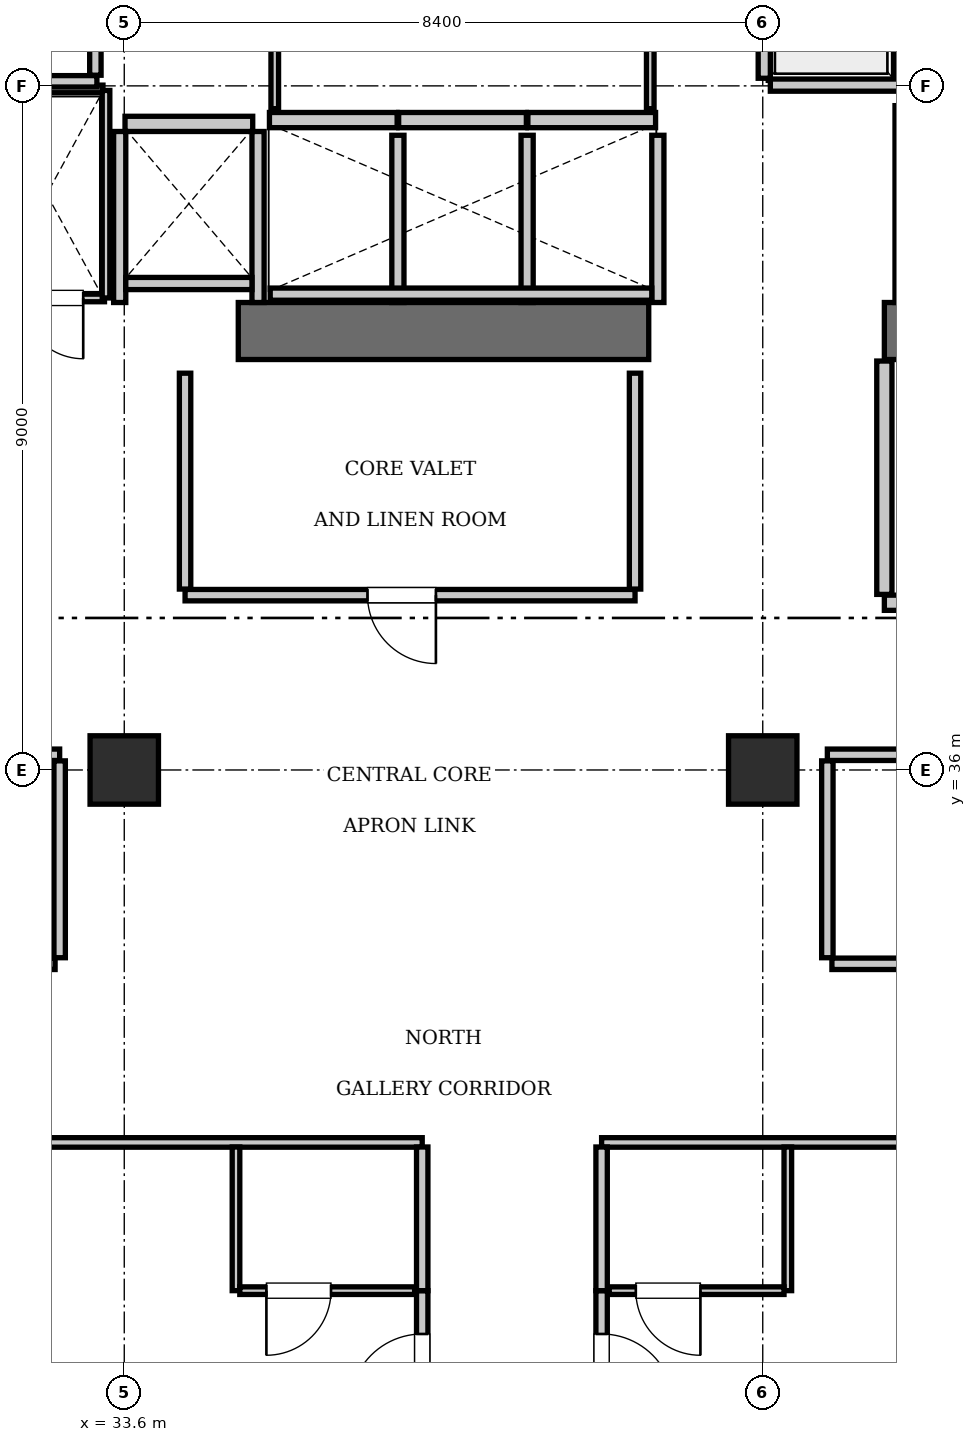
"""IFC4 building model, lengths in metres.
Left out: names, types, materials, properties, quantities, classifications, styles, units other than length and angle.
Written with IfcOpenShell. Run it as: python <this file> out.ifc"""

import sys

from ifc_helpers import new_model, si_unit, direction, frame, frame_2d, origin, origin_2d, place, context, subcontext, project, spatial, rectangle, extrude, element, fill, save


model = new_model("IFC4")
c1 = context("Model", 3, precision=1e-05, world=origin(), true_north=direction((0.0, 1.0)))
c2 = subcontext(c1, "Body", "Model", "MODEL_VIEW")
j1 = project(units=[si_unit("LENGTHUNIT", "METRE"), si_unit("PLANEANGLEUNIT", "RADIAN")], contexts=[c1])
p1 = place(None, origin())
s1 = spatial("IfcSite", under=j1, at=p1, CompositionType="ELEMENT")
p2 = place(p1, origin())
s2 = spatial("IfcBuilding", under=s1, at=p2, CompositionType="ELEMENT")
p3 = place(p2, frame((0.0, 0.0, 173.6)))
s3 = spatial("IfcBuildingStorey", under=s2, at=p3, CompositionType="ELEMENT", Elevation=173.6)
p4 = place(p3, frame((35.1, 41.775, 0.0), z_axis=(0.0, 0.0, 1.0), x_axis=(1.0, 0.0, 0.0)))
e1 = element("IfcWall", 1, at=p4, inside=s3, PredefinedType="SHEAR", context=c2, shape_type="SweptSolid", body=[
    extrude(rectangle(XDim=5.4, YDim=0.75, at=frame_2d((2.7, 0.0))), origin(), (0.0, 0.0, 1.0), 3.85),
])
p5 = place(p3, frame((43.6, 41.775, 0.0), z_axis=(0.0, 0.0, 1.0), x_axis=(1.0, 0.0, 0.0)))
e2 = element("IfcWall", 2, at=p5, inside=s3, PredefinedType="SHEAR", context=c2, shape_type="SweptSolid", body=[
    extrude(rectangle(XDim=6.8, YDim=0.75, at=frame_2d((3.4, 0.0))), origin(), (0.0, 0.0, 1.0), 3.85),
])
p6 = place(p5, frame((3.9, 0.0, 0.0)))
e3 = element("IfcOpeningElement", 3, at=p6, cuts=e2, PredefinedType="OPENING", context=c2, shape_type="SweptSolid", body=[
    extrude(rectangle(XDim=1.15, YDim=2.15, at=frame_2d((0.575, 1.075))), frame((0.0, 0.385, 0.0), z_axis=(0.0, -1.0, 0.0), x_axis=(1.0, 0.0, 0.0)), (0.0, 0.0, 1.0), 0.77),
])
p7 = place(p5, frame((0.55, 0.0, 0.0)))
e4 = element("IfcOpeningElement", 4, at=p7, cuts=e2, PredefinedType="OPENING", context=c2, shape_type="SweptSolid", body=[
    extrude(rectangle(XDim=1.1, YDim=2.2, at=frame_2d((0.55, 1.1))), frame((0.0, 0.385, 0.0), z_axis=(0.0, -1.0, 0.0), x_axis=(1.0, 0.0, 0.0)), (0.0, 0.0, 1.0), 0.77),
])
for number, where, z_axis, x_axis in (
    (5, (33.6, 36.0, 0.0), (0.0, 0.0, 1.0), (1.0, 0.0, 0.0)),
    (6, (42.0, 36.0, 0.0), (0.0, 0.0, 1.0), (1.0, 0.0, 0.0)),
):
    element("IfcColumn", number, at=place(p3, frame(where, z_axis=z_axis, x_axis=x_axis)), inside=s3, PredefinedType="COLUMN", context=c2, shape_type="SweptSolid", body=[
        extrude(rectangle(XDim=0.9, YDim=0.9, at=origin_2d()), origin(), (0.0, 0.0, 1.0), 3.85),
    ])
for number, where, z_axis, x_axis in (
    (7, (35.51, 44.55, 0.0), (0.0, 0.0, 1.0), (1.0, 0.0, 0.0)),
    (8, (37.21, 44.55, 0.0), (0.0, 0.0, 1.0), (1.0, 0.0, 0.0)),
):
    element("IfcWall", number, at=place(p3, frame(where, z_axis=z_axis, x_axis=x_axis)), inside=s3, PredefinedType="SOLIDWALL", context=c2, shape_type="SweptSolid", body=[
        extrude(rectangle(XDim=1.68, YDim=0.2, at=frame_2d((0.84, 0.0))), origin(), (0.0, 0.0, 1.0), 3.61),
    ])
p8 = place(p3, frame((38.91, 44.55, 0.0), z_axis=(0.0, 0.0, 1.0), x_axis=(1.0, 0.0, 0.0)))
e9 = element("IfcWall", 9, at=p8, inside=s3, PredefinedType="SOLIDWALL", context=c2, shape_type="SweptSolid", body=[
    extrude(rectangle(XDim=1.68, YDim=0.2, at=frame_2d((0.84, 0.0))), origin(), (0.0, 0.0, 1.0), 3.61),
])
p9 = place(p3, frame((33.61, 44.5, 0.0), z_axis=(0.0, 0.0, 1.0), x_axis=(1.0, 0.0, 0.0)))
e10 = element("IfcWall", 10, at=p9, inside=s3, PredefinedType="SOLIDWALL", context=c2, shape_type="SweptSolid", body=[
    extrude(rectangle(XDim=1.68, YDim=0.2, at=frame_2d((0.84, 0.0))), origin(), (0.0, 0.0, 1.0), 3.61),
])
p10 = place(p3, frame((43.82, 42.15, 0.0), z_axis=(0.0, 0.0, 1.0), x_axis=(0.0, 1.0, 0.0)))
e11 = element("IfcWall", 11, at=p10, inside=s3, PredefinedType="SOLIDWALL", context=c2, shape_type="SweptSolid", body=[
    extrude(rectangle(XDim=2.59, YDim=0.16, at=frame_2d((1.295, 0.0))), origin(), (0.0, 0.0, 1.0), 3.61),
])
for number, where, z_axis, x_axis in (
    (12, (42.02, 45.1, 0.0), (0.0, 0.0, 1.0), (0.0, 1.0, 0.0)),
    (13, (43.8, 45.1, 0.0), (0.0, 0.0, 1.0), (0.0, 1.0, 0.0)),
):
    element("IfcWall", number, at=place(p3, frame(where, z_axis=z_axis, x_axis=x_axis)), inside=s3, PredefinedType="SOLIDWALL", context=c2, shape_type="SweptSolid", body=[
        extrude(rectangle(XDim=1.95, YDim=0.16, at=frame_2d((0.975, 0.0))), origin(), (0.0, 0.0, 1.0), 3.61),
    ])
p11 = place(p3, frame((42.1, 45.01, 0.0), z_axis=(0.0, 0.0, 1.0), x_axis=(1.0, 0.0, 0.0)))
e14 = element("IfcWall", 14, at=p11, inside=s3, PredefinedType="SOLIDWALL", context=c2, shape_type="SweptSolid", body=[
    extrude(rectangle(XDim=3.45, YDim=0.16, at=frame_2d((1.725, 0.0))), origin(), (0.0, 0.0, 1.0), 3.61),
])
for number, where, z_axis, x_axis in (
    (15, (37.2, 42.15, 0.0), (0.0, 0.0, 1.0), (0.0, 1.0, 0.0)),
    (16, (38.9, 42.15, 0.0), (0.0, 0.0, 1.0), (0.0, 1.0, 0.0)),
    (17, (40.62, 42.15, 0.0), (0.0, 0.0, 1.0), (0.0, 1.0, 0.0)),
):
    element("IfcWall", number, at=place(p3, frame(where, z_axis=z_axis, x_axis=x_axis)), inside=s3, PredefinedType="SOLIDWALL", context=c2, shape_type="SweptSolid", body=[
        extrude(rectangle(XDim=2.2, YDim=0.16, at=frame_2d((1.1, 0.0))), origin(), (0.0, 0.0, 1.0), 3.61),
    ])
p12 = place(p3, frame((35.52, 42.26, 0.0), z_axis=(0.0, 0.0, 1.0), x_axis=(1.0, 0.0, 0.0)))
e18 = element("IfcWall", 18, at=p12, inside=s3, PredefinedType="SOLIDWALL", context=c2, shape_type="SweptSolid", body=[
    extrude(rectangle(XDim=5.02, YDim=0.16, at=frame_2d((2.51, 0.0))), origin(), (0.0, 0.0, 1.0), 3.61),
])
for number, where, z_axis, x_axis in (
    (19, (33.54, 42.15, 0.0), (0.0, 0.0, 1.0), (0.0, 1.0, 0.0)),
    (20, (35.36, 42.15, 0.0), (0.0, 0.0, 1.0), (0.0, 1.0, 0.0)),
):
    element("IfcWall", number, at=place(p3, frame(where, z_axis=z_axis, x_axis=x_axis)), inside=s3, PredefinedType="SOLIDWALL", context=c2, shape_type="SweptSolid", body=[
        extrude(rectangle(XDim=2.25, YDim=0.16, at=frame_2d((1.125, 0.0))), origin(), (0.0, 0.0, 1.0), 3.61),
    ])
p13 = place(p3, frame((33.62, 42.4, 0.0), z_axis=(0.0, 0.0, 1.0), x_axis=(1.0, 0.0, 0.0)))
e21 = element("IfcWall", 21, at=p13, inside=s3, PredefinedType="SOLIDWALL", context=c2, shape_type="SweptSolid", body=[
    extrude(rectangle(XDim=1.66, YDim=0.16, at=frame_2d((0.83, 0.0))), origin(), (0.0, 0.0, 1.0), 3.61),
])
p14 = place(p3, frame((43.6, 38.2, 0.0), z_axis=(0.0, 0.0, 1.0), x_axis=(1.0, 0.0, 0.0)))
e22 = element("IfcWall", 22, at=p14, inside=s3, PredefinedType="PARTITIONING", context=c2, shape_type="SweptSolid", body=[
    extrude(rectangle(XDim=5.8, YDim=0.2, at=frame_2d((2.9, 0.0))), origin(), (0.0, 0.0, 1.0), 3.61),
])
p15 = place(p14, frame((2.3, 0.0, 0.0)))
e23 = element("IfcOpeningElement", 23, at=p15, cuts=e22, PredefinedType="OPENING", context=c2, shape_type="SweptSolid", body=[
    extrude(rectangle(XDim=1.15, YDim=2.15, at=frame_2d((0.575, 1.075))), frame((0.0, 0.11, 0.0), z_axis=(0.0, -1.0, 0.0), x_axis=(1.0, 0.0, 0.0)), (0.0, 0.0, 1.0), 0.22),
])
p16 = place(p3, frame((43.6, 38.31, 0.0), z_axis=(0.0, 0.0, 1.0), x_axis=(0.0, 1.0, 0.0)))
e24 = element("IfcWall", 24, at=p16, inside=s3, PredefinedType="PARTITIONING", context=c2, shape_type="SweptSolid", body=[
    extrude(rectangle(XDim=3.07, YDim=0.2, at=frame_2d((1.535, 0.0))), origin(), (0.0, 0.0, 1.0), 3.61),
])
p17 = place(p3, frame((32.02, 42.21, 0.0), z_axis=(0.0, 0.0, 1.0), x_axis=(1.0, 0.0, 0.0)))
e25 = element("IfcWall", 25, at=p17, inside=s3, PredefinedType="PARTITIONING", context=c2, shape_type="SweptSolid", body=[
    extrude(rectangle(XDim=1.32, YDim=0.1, at=frame_2d((0.66, 0.0))), origin(), (0.0, 0.0, 1.0), 3.61),
])
p18 = place(p17, frame((0.24, 0.0, 0.0)))
e26 = element("IfcOpeningElement", 26, at=p18, cuts=e25, PredefinedType="OPENING", context=c2, shape_type="SweptSolid", body=[
    extrude(rectangle(XDim=0.8, YDim=2.05, at=frame_2d((0.4, 1.025))), frame((0.0, 0.06, 0.0), z_axis=(0.0, -1.0, 0.0), x_axis=(1.0, 0.0, 0.0)), (0.0, 0.0, 1.0), 0.12),
])
p19 = place(p3, frame((31.84, 44.96, 0.0), z_axis=(0.0, 0.0, 1.0), x_axis=(1.0, 0.0, 0.0)))
e27 = element("IfcWall", 27, at=p19, inside=s3, PredefinedType="PARTITIONING", context=c2, shape_type="SweptSolid", body=[
    extrude(rectangle(XDim=1.48, YDim=0.1, at=frame_2d((0.74, 0.0))), origin(), (0.0, 0.0, 1.0), 3.61),
])
p20 = place(p3, frame((33.36, 42.21, 0.0), z_axis=(0.0, 0.0, 1.0), x_axis=(0.0, 1.0, 0.0)))
e28 = element("IfcWall", 28, at=p20, inside=s3, PredefinedType="PARTITIONING", context=c2, shape_type="SweptSolid", body=[
    extrude(rectangle(XDim=2.73, YDim=0.1, at=frame_2d((1.365, 0.0))), origin(), (0.0, 0.0, 1.0), 3.61),
])
for number, where, z_axis, x_axis in (
    (29, (35.58, 44.7, 0.0), (0.0, 0.0, 1.0), (0.0, 1.0, 0.0)),
    (30, (40.52, 44.7, 0.0), (0.0, 0.0, 1.0), (0.0, 1.0, 0.0)),
):
    element("IfcWall", number, at=place(p3, frame(where, z_axis=z_axis, x_axis=x_axis)), inside=s3, PredefinedType="PARTITIONING", context=c2, shape_type="SweptSolid", body=[
        extrude(rectangle(XDim=1.08, YDim=0.1, at=frame_2d((0.54, 0.0))), origin(), (0.0, 0.0, 1.0), 3.61),
    ])
p21 = place(p3, frame((30.06, 45.06, 0.0), z_axis=(0.0, 0.0, 1.0), x_axis=(1.0, 0.0, 0.0)))
e31 = element("IfcWall", 31, at=p21, inside=s3, PredefinedType="PARTITIONING", context=c2, shape_type="SweptSolid", body=[
    extrude(rectangle(XDim=3.18, YDim=0.15, at=frame_2d((1.59, 0.0))), origin(), (0.0, 0.0, 1.0), 3.61),
])
p22 = place(p3, frame((33.22, 45.14, 0.0), z_axis=(0.0, 0.0, 1.0), x_axis=(0.0, 1.0, 0.0)))
e32 = element("IfcWall", 32, at=p22, inside=s3, PredefinedType="PARTITIONING", context=c2, shape_type="SweptSolid", body=[
    extrude(rectangle(XDim=4.16, YDim=0.15, at=frame_2d((2.08, 0.0))), origin(), (0.0, 0.0, 1.0), 3.61),
])
p23 = place(p3, frame((34.4, 38.3, 0.0), z_axis=(0.0, 0.0, 1.0), x_axis=(1.0, 0.0, 0.0)))
e33 = element("IfcWall", 33, at=p23, inside=s3, PredefinedType="PARTITIONING", context=c2, shape_type="SweptSolid", body=[
    extrude(rectangle(XDim=5.92, YDim=0.15, at=frame_2d((2.96, 0.0))), origin(), (0.0, 0.0, 1.0), 3.61),
])
p24 = place(p23, frame((2.4, 0.0, 0.0)))
e34 = element("IfcOpeningElement", 34, at=p24, cuts=e33, PredefinedType="OPENING", context=c2, shape_type="SweptSolid", body=[
    extrude(rectangle(XDim=0.9, YDim=2.1, at=frame_2d((0.45, 1.05))), frame((0.0, 0.085, 0.0), z_axis=(0.0, -1.0, 0.0), x_axis=(1.0, 0.0, 0.0)), (0.0, 0.0, 1.0), 0.17),
])
for number, where, z_axis, x_axis in (
    (35, (34.4, 38.38, 0.0), (0.0, 0.0, 1.0), (0.0, 1.0, 0.0)),
    (36, (40.32, 38.38, 0.0), (0.0, 0.0, 1.0), (0.0, 1.0, 0.0)),
):
    element("IfcWall", number, at=place(p3, frame(where, z_axis=z_axis, x_axis=x_axis)), inside=s3, PredefinedType="PARTITIONING", context=c2, shape_type="SweptSolid", body=[
        extrude(rectangle(XDim=2.84, YDim=0.15, at=frame_2d((1.42, 0.0))), origin(), (0.0, 0.0, 1.0), 3.61),
    ])
p25 = place(p3, frame((28.32, 36.2, 0.0), z_axis=(0.0, 0.0, 1.0), x_axis=(1.0, 0.0, 0.0)))
e37 = element("IfcWall", 37, at=p25, inside=s3, PredefinedType="PARTITIONING", context=c2, shape_type="SweptSolid", body=[
    extrude(rectangle(XDim=4.43, YDim=0.15, at=frame_2d((2.215, 0.0))), origin(), (0.0, 0.0, 1.0), 3.61),
])
p26 = place(p3, frame((32.75, 33.53, 0.0), z_axis=(0.0, 0.0, 1.0), x_axis=(0.0, 1.0, 0.0)))
e38 = element("IfcWall", 38, at=p26, inside=s3, PredefinedType="PARTITIONING", context=c2, shape_type="SweptSolid", body=[
    extrude(rectangle(XDim=2.59, YDim=0.15, at=frame_2d((1.295, 0.0))), origin(), (0.0, 0.0, 1.0), 3.61),
])
p27 = place(p3, frame((28.38, 33.45, 0.0), z_axis=(0.0, 0.0, 1.0), x_axis=(1.0, 0.0, 0.0)))
e39 = element("IfcWall", 39, at=p27, inside=s3, PredefinedType="PARTITIONING", context=c2, shape_type="SweptSolid", body=[
    extrude(rectangle(XDim=4.31, YDim=0.15, at=frame_2d((2.155, 0.0))), origin(), (0.0, 0.0, 1.0), 3.61),
])
p28 = place(p27, frame((1.705, 0.0, 0.0)))
e40 = element("IfcOpeningElement", 40, at=p28, cuts=e39, PredefinedType="OPENING", context=c2, shape_type="SweptSolid", body=[
    extrude(rectangle(XDim=0.9, YDim=2.1, at=frame_2d((0.45, 1.05))), frame((0.0, 0.085, 0.0), z_axis=(0.0, -1.0, 0.0), x_axis=(1.0, 0.0, 0.0)), (0.0, 0.0, 1.0), 0.17),
])
p29 = place(p3, frame((42.85, 36.2, 0.0), z_axis=(0.0, 0.0, 1.0), x_axis=(1.0, 0.0, 0.0)))
e41 = element("IfcWall", 41, at=p29, inside=s3, PredefinedType="PARTITIONING", context=c2, shape_type="SweptSolid", body=[
    extrude(rectangle(XDim=4.43, YDim=0.15, at=frame_2d((2.215, 0.0))), origin(), (0.0, 0.0, 1.0), 3.61),
])
p30 = place(p3, frame((42.85, 33.53, 0.0), z_axis=(0.0, 0.0, 1.0), x_axis=(0.0, 1.0, 0.0)))
e42 = element("IfcWall", 42, at=p30, inside=s3, PredefinedType="PARTITIONING", context=c2, shape_type="SweptSolid", body=[
    extrude(rectangle(XDim=2.59, YDim=0.15, at=frame_2d((1.295, 0.0))), origin(), (0.0, 0.0, 1.0), 3.61),
])
p31 = place(p3, frame((42.91, 33.45, 0.0), z_axis=(0.0, 0.0, 1.0), x_axis=(1.0, 0.0, 0.0)))
e43 = element("IfcWall", 43, at=p31, inside=s3, PredefinedType="PARTITIONING", context=c2, shape_type="SweptSolid", body=[
    extrude(rectangle(XDim=4.31, YDim=0.15, at=frame_2d((2.155, 0.0))), origin(), (0.0, 0.0, 1.0), 3.61),
])
p32 = place(p31, frame((1.705, 0.0, 0.0)))
e44 = element("IfcOpeningElement", 44, at=p32, cuts=e43, PredefinedType="OPENING", context=c2, shape_type="SweptSolid", body=[
    extrude(rectangle(XDim=0.9, YDim=2.1, at=frame_2d((0.45, 1.05))), frame((0.0, 0.085, 0.0), z_axis=(0.0, -1.0, 0.0), x_axis=(1.0, 0.0, 0.0)), (0.0, 0.0, 1.0), 0.17),
])
p33 = place(p3, frame((13.2, 31.1, 0.0), z_axis=(0.0, 0.0, 1.0), x_axis=(1.0, 0.0, 0.0)))
e45 = element("IfcWall", 45, at=p33, inside=s3, PredefinedType="PARTITIONING", context=c2, shape_type="SweptSolid", body=[
    extrude(rectangle(XDim=24.32, YDim=0.125, at=frame_2d((12.16, 0.0))), origin(), (0.0, 0.0, 1.0), 3.61),
])
p34 = place(p3, frame((39.88, 31.1, 0.0), z_axis=(0.0, 0.0, 1.0), x_axis=(1.0, 0.0, 0.0)))
e46 = element("IfcWall", 46, at=p34, inside=s3, PredefinedType="PARTITIONING", context=c2, shape_type="SweptSolid", body=[
    extrude(rectangle(XDim=22.52, YDim=0.125, at=frame_2d((11.26, 0.0))), origin(), (0.0, 0.0, 1.0), 3.61),
])
p35 = place(p3, frame((37.52, 27.06, 0.0), z_axis=(0.0, 0.0, 1.0), x_axis=(0.0, 1.0, 0.0)))
e47 = element("IfcWall", 47, at=p35, inside=s3, PredefinedType="PARTITIONING", context=c2, shape_type="SweptSolid", body=[
    extrude(rectangle(XDim=2.09, YDim=0.15, at=frame_2d((1.045, 0.0))), origin(), (0.0, 0.0, 1.0), 3.61),
])
p36 = place(p35, frame((0.57, 0.0, 0.0)))
e48 = element("IfcOpeningElement", 48, at=p36, cuts=e47, PredefinedType="OPENING", context=c2, shape_type="SweptSolid", body=[
    extrude(rectangle(XDim=0.95, YDim=2.15, at=frame_2d((0.475, 1.075))), frame((0.0, 0.085, 0.0), z_axis=(0.0, -1.0, 0.0), x_axis=(1.0, 0.0, 0.0)), (0.0, 0.0, 1.0), 0.17),
])
p37 = place(p3, frame((37.52, 29.15, 0.0), z_axis=(0.0, 0.0, 1.0), x_axis=(0.0, 1.0, 0.0)))
e49 = element("IfcWall", 49, at=p37, inside=s3, PredefinedType="PARTITIONING", context=c2, shape_type="SweptSolid", body=[
    extrude(rectangle(XDim=1.89, YDim=0.15, at=frame_2d((0.945, 0.0))), origin(), (0.0, 0.0, 1.0), 3.61),
])
p38 = place(p3, frame((35.07, 29.15, 0.0), z_axis=(0.0, 0.0, 1.0), x_axis=(0.0, 1.0, 0.0)))
e50 = element("IfcWall", 50, at=p38, inside=s3, PredefinedType="PARTITIONING", context=c2, shape_type="SweptSolid", body=[
    extrude(rectangle(XDim=1.89, YDim=0.1, at=frame_2d((0.945, 0.0))), origin(), (0.0, 0.0, 1.0), 3.61),
])
p39 = place(p3, frame((35.12, 29.15, 0.0), z_axis=(0.0, 0.0, 1.0), x_axis=(1.0, 0.0, 0.0)))
e51 = element("IfcWall", 51, at=p39, inside=s3, PredefinedType="PARTITIONING", context=c2, shape_type="SweptSolid", body=[
    extrude(rectangle(XDim=2.3, YDim=0.1, at=frame_2d((1.15, 0.0))), origin(), (0.0, 0.0, 1.0), 3.61),
])
p40 = place(p39, frame((0.35, 0.0, 0.0)))
e52 = element("IfcOpeningElement", 52, at=p40, cuts=e51, PredefinedType="OPENING", context=c2, shape_type="SweptSolid", body=[
    extrude(rectangle(XDim=0.85, YDim=2.1, at=frame_2d((0.425, 1.05))), frame((0.0, 0.06, 0.0), z_axis=(0.0, -1.0, 0.0), x_axis=(1.0, 0.0, 0.0)), (0.0, 0.0, 1.0), 0.12),
])
p41 = place(p3, frame((39.88, 27.06, 0.0), z_axis=(0.0, 0.0, 1.0), x_axis=(0.0, 1.0, 0.0)))
e53 = element("IfcWall", 53, at=p41, inside=s3, PredefinedType="PARTITIONING", context=c2, shape_type="SweptSolid", body=[
    extrude(rectangle(XDim=2.09, YDim=0.15, at=frame_2d((1.045, 0.0))), origin(), (0.0, 0.0, 1.0), 3.61),
])
p42 = place(p41, frame((0.57, 0.0, 0.0)))
e54 = element("IfcOpeningElement", 54, at=p42, cuts=e53, PredefinedType="OPENING", context=c2, shape_type="SweptSolid", body=[
    extrude(rectangle(XDim=0.95, YDim=2.15, at=frame_2d((0.475, 1.075))), frame((0.0, 0.085, 0.0), z_axis=(0.0, -1.0, 0.0), x_axis=(1.0, 0.0, 0.0)), (0.0, 0.0, 1.0), 0.17),
])
p43 = place(p3, frame((39.88, 29.15, 0.0), z_axis=(0.0, 0.0, 1.0), x_axis=(0.0, 1.0, 0.0)))
e55 = element("IfcWall", 55, at=p43, inside=s3, PredefinedType="PARTITIONING", context=c2, shape_type="SweptSolid", body=[
    extrude(rectangle(XDim=1.89, YDim=0.15, at=frame_2d((0.945, 0.0))), origin(), (0.0, 0.0, 1.0), 3.61),
])
p44 = place(p3, frame((42.33, 29.15, 0.0), z_axis=(0.0, 0.0, 1.0), x_axis=(0.0, 1.0, 0.0)))
e56 = element("IfcWall", 56, at=p44, inside=s3, PredefinedType="PARTITIONING", context=c2, shape_type="SweptSolid", body=[
    extrude(rectangle(XDim=1.89, YDim=0.1, at=frame_2d((0.945, 0.0))), origin(), (0.0, 0.0, 1.0), 3.61),
])
p45 = place(p3, frame((39.98, 29.15, 0.0), z_axis=(0.0, 0.0, 1.0), x_axis=(1.0, 0.0, 0.0)))
e57 = element("IfcWall", 57, at=p45, inside=s3, PredefinedType="PARTITIONING", context=c2, shape_type="SweptSolid", body=[
    extrude(rectangle(XDim=2.3, YDim=0.1, at=frame_2d((1.15, 0.0))), origin(), (0.0, 0.0, 1.0), 3.61),
])
p46 = place(p45, frame((0.35, 0.0, 0.0)))
e58 = element("IfcOpeningElement", 58, at=p46, cuts=e57, PredefinedType="OPENING", context=c2, shape_type="SweptSolid", body=[
    extrude(rectangle(XDim=0.85, YDim=2.1, at=frame_2d((0.425, 1.05))), frame((0.0, 0.06, 0.0), z_axis=(0.0, -1.0, 0.0), x_axis=(1.0, 0.0, 0.0)), (0.0, 0.0, 1.0), 0.12),
])
p47 = place(p18, frame((0.8, 0.0, 0.0), z_axis=(0.0, 0.0, 1.0), x_axis=(-1.0, 0.0, 0.0)))
e59 = element("IfcDoor", 59, at=p47, inside=s3, OperationType="SINGLE_SWING_LEFT", PredefinedType="DOOR", context=c2, shape_type="SweptSolid", body=[
    extrude(rectangle(XDim=0.8, YDim=2.05, at=frame_2d((0.4, 1.025))), frame((0.0, 0.025, 0.0), z_axis=(0.0, -1.0, 0.0), x_axis=(1.0, 0.0, 0.0)), (0.0, 0.0, 1.0), 0.05),
])
fill(e26, e59)
p48 = place(p24, frame((0.9, 0.0, 0.0), z_axis=(0.0, 0.0, 1.0), x_axis=(-1.0, 0.0, 0.0)))
e60 = element("IfcDoor", 60, at=p48, inside=s3, OperationType="SINGLE_SWING_LEFT", PredefinedType="DOOR", context=c2, shape_type="SweptSolid", body=[
    extrude(rectangle(XDim=0.9, YDim=2.1, at=frame_2d((0.45, 1.05))), frame((0.0, 0.025, 0.0), z_axis=(0.0, -1.0, 0.0), x_axis=(1.0, 0.0, 0.0)), (0.0, 0.0, 1.0), 0.05),
])
fill(e34, e60)
p49 = place(p40, frame((0.85, 0.0, 0.0), z_axis=(0.0, 0.0, 1.0), x_axis=(-1.0, 0.0, 0.0)))
e61 = element("IfcDoor", 61, at=p49, inside=s3, OperationType="SINGLE_SWING_RIGHT", PredefinedType="DOOR", context=c2, shape_type="SweptSolid", body=[
    extrude(rectangle(XDim=0.85, YDim=2.1, at=frame_2d((0.425, 1.05))), frame((0.0, 0.025, 0.0), z_axis=(0.0, -1.0, 0.0), x_axis=(1.0, 0.0, 0.0)), (0.0, 0.0, 1.0), 0.05),
])
fill(e52, e61)
p50 = place(p36, origin())
e62 = element("IfcDoor", 62, at=p50, inside=s3, OperationType="SINGLE_SWING_LEFT", PredefinedType="DOOR", context=c2, shape_type="SweptSolid", body=[
    extrude(rectangle(XDim=0.95, YDim=2.15, at=frame_2d((0.475, 1.075))), frame((0.0, 0.025, 0.0), z_axis=(0.0, -1.0, 0.0), x_axis=(1.0, 0.0, 0.0)), (0.0, 0.0, 1.0), 0.05),
])
fill(e48, e62)
p51 = place(p46, frame((0.85, 0.0, 0.0), z_axis=(0.0, 0.0, 1.0), x_axis=(-1.0, 0.0, 0.0)))
e63 = element("IfcDoor", 63, at=p51, inside=s3, OperationType="SINGLE_SWING_LEFT", PredefinedType="DOOR", context=c2, shape_type="SweptSolid", body=[
    extrude(rectangle(XDim=0.85, YDim=2.1, at=frame_2d((0.425, 1.05))), frame((0.0, 0.025, 0.0), z_axis=(0.0, -1.0, 0.0), x_axis=(1.0, 0.0, 0.0)), (0.0, 0.0, 1.0), 0.05),
])
fill(e58, e63)
p52 = place(p42, frame((0.95, 0.0, 0.0), z_axis=(0.0, 0.0, 1.0), x_axis=(-1.0, 0.0, 0.0)))
e64 = element("IfcDoor", 64, at=p52, inside=s3, OperationType="SINGLE_SWING_RIGHT", PredefinedType="DOOR", context=c2, shape_type="SweptSolid", body=[
    extrude(rectangle(XDim=0.95, YDim=2.15, at=frame_2d((0.475, 1.075))), frame((0.0, 0.025, 0.0), z_axis=(0.0, -1.0, 0.0), x_axis=(1.0, 0.0, 0.0)), (0.0, 0.0, 1.0), 0.05),
])
fill(e54, e64)
save(model, sys.argv[1])
